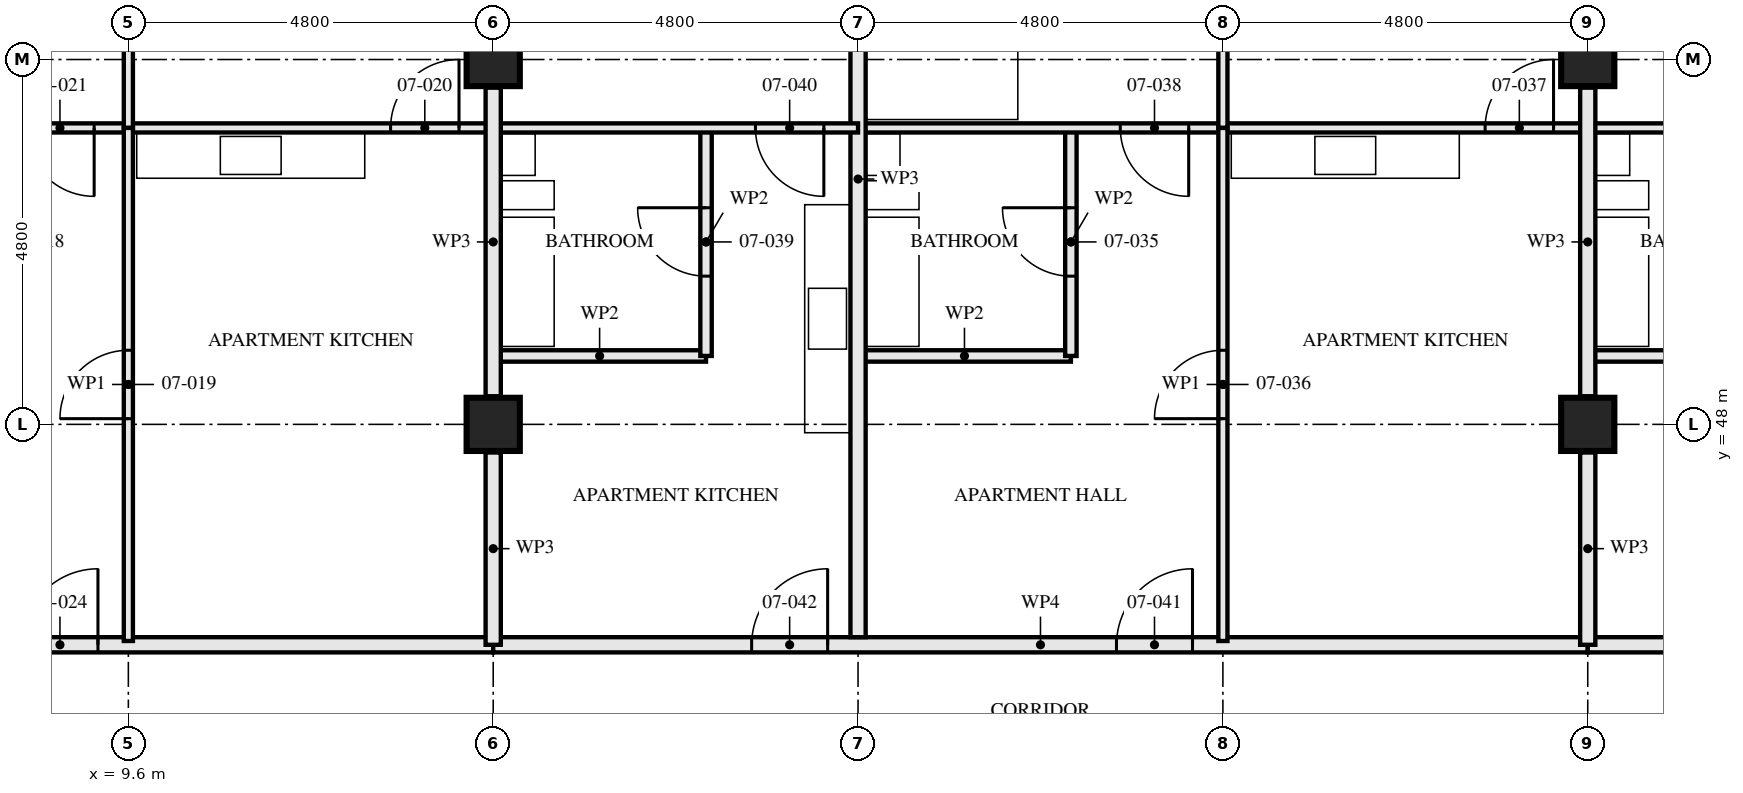
"""IFC4 building model, lengths in metres.
Left out: names, types, materials, properties, quantities, classifications, styles, units other than length and angle.
Written with IfcOpenShell. Run it as: python <this file> out.ifc"""

import sys

from ifc_helpers import new_model, si_unit, direction, frame, frame_2d, origin, origin_2d, place, context, subcontext, project, spatial, rectangle, hollow_rectangle, extrude, element, fill, save


model = new_model("IFC4")
c1 = context("Model", 3, precision=1e-05, world=origin(), true_north=direction((0.0, 1.0)))
c2 = subcontext(c1, "Body", "Model", "MODEL_VIEW")
j1 = project(units=[si_unit("LENGTHUNIT", "METRE"), si_unit("PLANEANGLEUNIT", "RADIAN")], contexts=[c1])
p1 = place(None, origin())
s1 = spatial("IfcSite", under=j1, at=p1, CompositionType="ELEMENT")
p2 = place(p1, origin())
s2 = spatial("IfcBuilding", under=s1, at=p2, CompositionType="ELEMENT")
p3 = place(p2, frame((0.0, 0.0, 30.5)))
s3 = spatial("IfcBuildingStorey", under=s2, at=p3, CompositionType="ELEMENT", Elevation=30.5)
for number, where, z_axis, x_axis in (
    (1, (14.4, 48.0, 0.0), (0.0, 0.0, 1.0), (1.0, 0.0, 0.0)),
    (2, (14.4, 52.8, 0.0), (0.0, 0.0, 1.0), (1.0, 0.0, 0.0)),
    (3, (28.8, 48.0, 0.0), (0.0, 0.0, 1.0), (1.0, 0.0, 0.0)),
    (4, (28.8, 52.8, 0.0), (0.0, 0.0, 1.0), (1.0, 0.0, 0.0)),
):
    element("IfcColumn", number, at=place(p3, frame(where, z_axis=z_axis, x_axis=x_axis)), inside=s3, PredefinedType="COLUMN", context=c2, shape_type="SweptSolid", body=[
        extrude(hollow_rectangle(XDim=0.7, YDim=0.7, WallThickness=0.06, at=origin_2d()), origin(), (0.0, 0.0, 1.0), 3.5),
    ])
p4 = place(p3, frame((9.6, 51.9, 0.0), z_axis=(0.0, 0.0, 1.0), x_axis=(0.0, -1.0, 0.0)))
e5 = element("IfcWall", 5, at=p4, inside=s3, PredefinedType="PARTITIONING", context=c2, shape_type="SweptSolid", body=[
    extrude(rectangle(XDim=6.75, YDim=0.12, at=frame_2d((3.375, 0.0))), origin(), (0.0, 0.0, 1.0), 2.55),
])
p5 = place(p4, frame((2.925, 0.0, 0.0)))
e6 = element("IfcOpeningElement", 6, at=p5, cuts=e5, PredefinedType="OPENING", context=c2, shape_type="SweptSolid", body=[
    extrude(rectangle(XDim=0.9, YDim=2.1, at=frame_2d((0.45, 1.05))), frame((0.0, 0.071, 0.0), z_axis=(0.0, -1.0, 0.0), x_axis=(1.0, 0.0, 0.0)), (0.0, 0.0, 1.0), 0.141),
])
p6 = place(p3, frame((14.4, 51.9, 0.0), z_axis=(0.0, 0.0, 1.0), x_axis=(-1.0, 0.0, 0.0)))
e7 = element("IfcWall", 7, at=p6, inside=s3, PredefinedType="PARTITIONING", context=c2, shape_type="SweptSolid", body=[
    extrude(rectangle(XDim=4.8, YDim=0.12, at=frame_2d((2.4, 0.0))), origin(), (0.0, 0.0, 1.0), 3.33),
])
p7 = place(p6, frame((0.45, 0.0, 0.0)))
e8 = element("IfcOpeningElement", 8, at=p7, cuts=e7, PredefinedType="OPENING", context=c2, shape_type="SweptSolid", body=[
    extrude(rectangle(XDim=0.9, YDim=2.1, at=frame_2d((0.45, 1.05))), frame((0.0, 0.071, 0.0), z_axis=(0.0, -1.0, 0.0), x_axis=(1.0, 0.0, 0.0)), (0.0, 0.0, 1.0), 0.141),
])
p8 = place(p3, frame((9.6, 51.9, 0.0), z_axis=(0.0, 0.0, 1.0), x_axis=(-1.0, 0.0, 0.0)))
e9 = element("IfcWall", 9, at=p8, inside=s3, PredefinedType="PARTITIONING", context=c2, shape_type="SweptSolid", body=[
    extrude(rectangle(XDim=4.8, YDim=0.12, at=frame_2d((2.4, 0.0))), origin(), (0.0, 0.0, 1.0), 3.33),
])
p9 = place(p8, frame((0.45, 0.0, 0.0)))
e10 = element("IfcOpeningElement", 10, at=p9, cuts=e9, PredefinedType="OPENING", context=c2, shape_type="SweptSolid", body=[
    extrude(rectangle(XDim=0.9, YDim=2.1, at=frame_2d((0.45, 1.05))), frame((0.0, 0.071, 0.0), z_axis=(0.0, -1.0, 0.0), x_axis=(1.0, 0.0, 0.0)), (0.0, 0.0, 1.0), 0.141),
])
p10 = place(p3, frame((9.6, 57.28, 0.0), z_axis=(0.0, 0.0, 1.0), x_axis=(0.0, -1.0, 0.0)))
e11 = element("IfcWall", 11, at=p10, inside=s3, PredefinedType="PARTITIONING", context=c2, shape_type="SweptSolid", body=[
    extrude(rectangle(XDim=5.38, YDim=0.12, at=frame_2d((2.69, 0.0))), origin(), (0.0, 0.0, 1.0), 2.55),
])
p11 = place(p3, frame((14.4, 45.1, 0.0), z_axis=(0.0, 0.0, 1.0), x_axis=(-1.0, 0.0, 0.0)))
e12 = element("IfcWall", 12, at=p11, inside=s3, PredefinedType="PARTITIONING", context=c2, shape_type="SweptSolid", body=[
    extrude(rectangle(XDim=9.6, YDim=0.2, at=frame_2d((4.8, 0.0))), origin(), (0.0, 0.0, 1.0), 3.33),
])
p12 = place(p11, frame((5.2, 0.0, 0.0)))
e13 = element("IfcOpeningElement", 13, at=p12, cuts=e12, PredefinedType="OPENING", context=c2, shape_type="SweptSolid", body=[
    extrude(rectangle(XDim=1.0, YDim=2.1, at=frame_2d((0.5, 1.05))), frame((0.0, 0.111, 0.0), z_axis=(0.0, -1.0, 0.0), x_axis=(1.0, 0.0, 0.0)), (0.0, 0.0, 1.0), 0.221),
])
p13 = place(p3, frame((22.0, 51.9, 0.0), z_axis=(0.0, 0.0, 1.0), x_axis=(0.0, -1.0, 0.0)))
e14 = element("IfcWall", 14, at=p13, inside=s3, PredefinedType="PARTITIONING", context=c2, shape_type="SweptSolid", body=[
    extrude(rectangle(XDim=3.0, YDim=0.15, at=frame_2d((1.5, 0.0))), origin(), (0.0, 0.0, 1.0), 3.33),
])
p14 = place(p13, frame((1.05, 0.0, 0.0)))
e15 = element("IfcOpeningElement", 15, at=p14, cuts=e14, PredefinedType="OPENING", context=c2, shape_type="SweptSolid", body=[
    extrude(rectangle(XDim=0.9, YDim=2.1, at=frame_2d((0.45, 1.05))), frame((0.0, 0.085, 0.0), z_axis=(0.0, -1.0, 0.0), x_axis=(1.0, 0.0, 0.0)), (0.0, 0.0, 1.0), 0.171),
])
p15 = place(p3, frame((22.0, 48.9, 0.0), z_axis=(0.0, 0.0, 1.0), x_axis=(-1.0, 0.0, 0.0)))
e16 = element("IfcWall", 16, at=p15, inside=s3, PredefinedType="PARTITIONING", context=c2, shape_type="SweptSolid", body=[
    extrude(rectangle(XDim=2.8, YDim=0.15, at=frame_2d((1.4, 0.0))), origin(), (0.0, 0.0, 1.0), 3.33),
])
p16 = place(p3, frame((24.0, 51.9, 0.0), z_axis=(0.0, 0.0, 1.0), x_axis=(0.0, -1.0, 0.0)))
e17 = element("IfcWall", 17, at=p16, inside=s3, PredefinedType="PARTITIONING", context=c2, shape_type="SweptSolid", body=[
    extrude(rectangle(XDim=6.75, YDim=0.12, at=frame_2d((3.375, 0.0))), origin(), (0.0, 0.0, 1.0), 2.55),
])
p17 = place(p16, frame((2.925, 0.0, 0.0)))
e18 = element("IfcOpeningElement", 18, at=p17, cuts=e17, PredefinedType="OPENING", context=c2, shape_type="SweptSolid", body=[
    extrude(rectangle(XDim=0.9, YDim=2.1, at=frame_2d((0.45, 1.05))), frame((0.0, 0.071, 0.0), z_axis=(0.0, -1.0, 0.0), x_axis=(1.0, 0.0, 0.0)), (0.0, 0.0, 1.0), 0.141),
])
p18 = place(p3, frame((28.8, 51.9, 0.0), z_axis=(0.0, 0.0, 1.0), x_axis=(-1.0, 0.0, 0.0)))
e19 = element("IfcWall", 19, at=p18, inside=s3, PredefinedType="PARTITIONING", context=c2, shape_type="SweptSolid", body=[
    extrude(rectangle(XDim=4.8, YDim=0.12, at=frame_2d((2.4, 0.0))), origin(), (0.0, 0.0, 1.0), 3.33),
])
p19 = place(p18, frame((0.45, 0.0, 0.0)))
e20 = element("IfcOpeningElement", 20, at=p19, cuts=e19, PredefinedType="OPENING", context=c2, shape_type="SweptSolid", body=[
    extrude(rectangle(XDim=0.9, YDim=2.1, at=frame_2d((0.45, 1.05))), frame((0.0, 0.071, 0.0), z_axis=(0.0, -1.0, 0.0), x_axis=(1.0, 0.0, 0.0)), (0.0, 0.0, 1.0), 0.141),
])
p20 = place(p3, frame((24.0, 51.9, 0.0), z_axis=(0.0, 0.0, 1.0), x_axis=(-1.0, 0.0, 0.0)))
e21 = element("IfcWall", 21, at=p20, inside=s3, PredefinedType="PARTITIONING", context=c2, shape_type="SweptSolid", body=[
    extrude(rectangle(XDim=4.8, YDim=0.12, at=frame_2d((2.4, 0.0))), origin(), (0.0, 0.0, 1.0), 3.33),
])
p21 = place(p20, frame((0.45, 0.0, 0.0)))
e22 = element("IfcOpeningElement", 22, at=p21, cuts=e21, PredefinedType="OPENING", context=c2, shape_type="SweptSolid", body=[
    extrude(rectangle(XDim=0.9, YDim=2.1, at=frame_2d((0.45, 1.05))), frame((0.0, 0.071, 0.0), z_axis=(0.0, -1.0, 0.0), x_axis=(1.0, 0.0, 0.0)), (0.0, 0.0, 1.0), 0.141),
])
p22 = place(p3, frame((24.0, 57.255, 0.0), z_axis=(0.0, 0.0, 1.0), x_axis=(0.0, -1.0, 0.0)))
e23 = element("IfcWall", 23, at=p22, inside=s3, PredefinedType="PARTITIONING", context=c2, shape_type="SweptSolid", body=[
    extrude(rectangle(XDim=5.355, YDim=0.12, at=frame_2d((2.677, 0.0))), origin(), (0.0, 0.0, 1.0), 2.55),
])
p23 = place(p3, frame((19.2, 57.255, 0.0), z_axis=(0.0, 0.0, 1.0), x_axis=(0.0, -1.0, 0.0)))
e24 = element("IfcWall", 24, at=p23, inside=s3, PredefinedType="PARTITIONING", context=c2, shape_type="SweptSolid", body=[
    extrude(rectangle(XDim=12.055, YDim=0.2, at=frame_2d((6.027, 0.0))), origin(), (0.0, 0.0, 1.0), 2.55),
])
p24 = place(p3, frame((17.2, 51.9, 0.0), z_axis=(0.0, 0.0, 1.0), x_axis=(0.0, -1.0, 0.0)))
e25 = element("IfcWall", 25, at=p24, inside=s3, PredefinedType="PARTITIONING", context=c2, shape_type="SweptSolid", body=[
    extrude(rectangle(XDim=3.0, YDim=0.15, at=frame_2d((1.5, 0.0))), origin(), (0.0, 0.0, 1.0), 3.33),
])
p25 = place(p24, frame((1.05, 0.0, 0.0)))
e26 = element("IfcOpeningElement", 26, at=p25, cuts=e25, PredefinedType="OPENING", context=c2, shape_type="SweptSolid", body=[
    extrude(rectangle(XDim=0.9, YDim=2.1, at=frame_2d((0.45, 1.05))), frame((0.0, 0.085, 0.0), z_axis=(0.0, -1.0, 0.0), x_axis=(1.0, 0.0, 0.0)), (0.0, 0.0, 1.0), 0.171),
])
p26 = place(p3, frame((17.2, 48.9, 0.0), z_axis=(0.0, 0.0, 1.0), x_axis=(-1.0, 0.0, 0.0)))
e27 = element("IfcWall", 27, at=p26, inside=s3, PredefinedType="PARTITIONING", context=c2, shape_type="SweptSolid", body=[
    extrude(rectangle(XDim=2.8, YDim=0.15, at=frame_2d((1.4, 0.0))), origin(), (0.0, 0.0, 1.0), 3.33),
])
p27 = place(p3, frame((19.2, 51.9, 0.0), z_axis=(0.0, 0.0, 1.0), x_axis=(-1.0, 0.0, 0.0)))
e28 = element("IfcWall", 28, at=p27, inside=s3, PredefinedType="PARTITIONING", context=c2, shape_type="SweptSolid", body=[
    extrude(rectangle(XDim=4.8, YDim=0.12, at=frame_2d((2.4, 0.0))), origin(), (0.0, 0.0, 1.0), 3.33),
])
p28 = place(p27, frame((0.45, 0.0, 0.0)))
e29 = element("IfcOpeningElement", 29, at=p28, cuts=e28, PredefinedType="OPENING", context=c2, shape_type="SweptSolid", body=[
    extrude(rectangle(XDim=0.9, YDim=2.1, at=frame_2d((0.45, 1.05))), frame((0.0, 0.071, 0.0), z_axis=(0.0, -1.0, 0.0), x_axis=(1.0, 0.0, 0.0)), (0.0, 0.0, 1.0), 0.141),
])
p29 = place(p3, frame((28.8, 45.1, 0.0), z_axis=(0.0, 0.0, 1.0), x_axis=(-1.0, 0.0, 0.0)))
e30 = element("IfcWall", 30, at=p29, inside=s3, PredefinedType="PARTITIONING", context=c2, shape_type="SweptSolid", body=[
    extrude(rectangle(XDim=14.4, YDim=0.2, at=frame_2d((7.2, 0.0))), origin(), (0.0, 0.0, 1.0), 3.33),
])
p30 = place(p29, frame((5.2, 0.0, 0.0)))
e31 = element("IfcOpeningElement", 31, at=p30, cuts=e30, PredefinedType="OPENING", context=c2, shape_type="SweptSolid", body=[
    extrude(rectangle(XDim=1.0, YDim=2.1, at=frame_2d((0.5, 1.05))), frame((0.0, 0.111, 0.0), z_axis=(0.0, -1.0, 0.0), x_axis=(1.0, 0.0, 0.0)), (0.0, 0.0, 1.0), 0.221),
])
p31 = place(p29, frame((10.0, 0.0, 0.0)))
e32 = element("IfcOpeningElement", 32, at=p31, cuts=e30, PredefinedType="OPENING", context=c2, shape_type="SweptSolid", body=[
    extrude(rectangle(XDim=1.0, YDim=2.1, at=frame_2d((0.5, 1.05))), frame((0.0, 0.111, 0.0), z_axis=(0.0, -1.0, 0.0), x_axis=(1.0, 0.0, 0.0)), (0.0, 0.0, 1.0), 0.221),
])
p32 = place(p3, frame((31.6, 48.9, 0.0), z_axis=(0.0, 0.0, 1.0), x_axis=(-1.0, 0.0, 0.0)))
e33 = element("IfcWall", 33, at=p32, inside=s3, PredefinedType="PARTITIONING", context=c2, shape_type="SweptSolid", body=[
    extrude(rectangle(XDim=2.8, YDim=0.15, at=frame_2d((1.4, 0.0))), origin(), (0.0, 0.0, 1.0), 3.33),
])
p33 = place(p3, frame((33.6, 51.9, 0.0), z_axis=(0.0, 0.0, 1.0), x_axis=(-1.0, 0.0, 0.0)))
e34 = element("IfcWall", 34, at=p33, inside=s3, PredefinedType="PARTITIONING", context=c2, shape_type="SweptSolid", body=[
    extrude(rectangle(XDim=4.8, YDim=0.12, at=frame_2d((2.4, 0.0))), origin(), (0.0, 0.0, 1.0), 3.33),
])
p34 = place(p33, frame((0.45, 0.0, 0.0)))
e35 = element("IfcOpeningElement", 35, at=p34, cuts=e34, PredefinedType="OPENING", context=c2, shape_type="SweptSolid", body=[
    extrude(rectangle(XDim=0.9, YDim=2.1, at=frame_2d((0.45, 1.05))), frame((0.0, 0.071, 0.0), z_axis=(0.0, -1.0, 0.0), x_axis=(1.0, 0.0, 0.0)), (0.0, 0.0, 1.0), 0.141),
])
p35 = place(p3, frame((38.4, 45.1, 0.0), z_axis=(0.0, 0.0, 1.0), x_axis=(-1.0, 0.0, 0.0)))
e36 = element("IfcWall", 36, at=p35, inside=s3, PredefinedType="PARTITIONING", context=c2, shape_type="SweptSolid", body=[
    extrude(rectangle(XDim=9.6, YDim=0.2, at=frame_2d((4.8, 0.0))), origin(), (0.0, 0.0, 1.0), 3.33),
])
p36 = place(p35, frame((0.4, 0.0, 0.0)))
e37 = element("IfcOpeningElement", 37, at=p36, cuts=e36, PredefinedType="OPENING", context=c2, shape_type="SweptSolid", body=[
    extrude(rectangle(XDim=1.0, YDim=2.1, at=frame_2d((0.5, 1.05))), frame((0.0, 0.111, 0.0), z_axis=(0.0, -1.0, 0.0), x_axis=(1.0, 0.0, 0.0)), (0.0, 0.0, 1.0), 0.221),
])
p37 = place(p35, frame((5.2, 0.0, 0.0)))
e38 = element("IfcOpeningElement", 38, at=p37, cuts=e36, PredefinedType="OPENING", context=c2, shape_type="SweptSolid", body=[
    extrude(rectangle(XDim=1.0, YDim=2.1, at=frame_2d((0.5, 1.05))), frame((0.0, 0.111, 0.0), z_axis=(0.0, -1.0, 0.0), x_axis=(1.0, 0.0, 0.0)), (0.0, 0.0, 1.0), 0.221),
])
p38 = place(p3, frame((14.4, 45.1, 0.0), z_axis=(0.0, 0.0, 1.0), x_axis=(0.0, 1.0, 0.0)))
e39 = element("IfcWall", 39, at=p38, inside=s3, PredefinedType="PARTITIONING", context=c2, shape_type="SweptSolid", body=[
    extrude(rectangle(XDim=2.53, YDim=0.2, at=frame_2d((1.265, 0.0))), origin(), (0.0, 0.0, 1.0), 2.32),
])
p39 = place(p3, frame((14.4, 48.37, 0.0), z_axis=(0.0, 0.0, 1.0), x_axis=(0.0, 1.0, 0.0)))
e40 = element("IfcWall", 40, at=p39, inside=s3, PredefinedType="PARTITIONING", context=c2, shape_type="SweptSolid", body=[
    extrude(rectangle(XDim=4.06, YDim=0.2, at=frame_2d((2.03, 0.0))), origin(), (0.0, 0.0, 1.0), 2.32),
])
p40 = place(p3, frame((28.8, 45.1, 0.0), z_axis=(0.0, 0.0, 1.0), x_axis=(0.0, 1.0, 0.0)))
e41 = element("IfcWall", 41, at=p40, inside=s3, PredefinedType="PARTITIONING", context=c2, shape_type="SweptSolid", body=[
    extrude(rectangle(XDim=2.53, YDim=0.2, at=frame_2d((1.265, 0.0))), origin(), (0.0, 0.0, 1.0), 2.32),
])
p41 = place(p3, frame((28.8, 48.37, 0.0), z_axis=(0.0, 0.0, 1.0), x_axis=(0.0, 1.0, 0.0)))
e42 = element("IfcWall", 42, at=p41, inside=s3, PredefinedType="PARTITIONING", context=c2, shape_type="SweptSolid", body=[
    extrude(rectangle(XDim=4.06, YDim=0.2, at=frame_2d((2.03, 0.0))), origin(), (0.0, 0.0, 1.0), 2.32),
])
p42 = place(p5, frame((0.9, 0.0, 0.0), z_axis=(0.0, 0.0, 1.0), x_axis=(-1.0, 0.0, 0.0)))
e43 = element("IfcDoor", 43, at=p42, inside=s3, OperationType="SINGLE_SWING_RIGHT", PredefinedType="DOOR", context=c2, shape_type="SweptSolid", body=[
    extrude(rectangle(XDim=0.9, YDim=2.1, at=frame_2d((0.45, 1.05))), frame((0.0, 0.022, 0.0), z_axis=(0.0, -1.0, 0.0), x_axis=(1.0, 0.0, 0.0)), (0.0, 0.0, 1.0), 0.044),
])
fill(e6, e43)
p43 = place(p7, frame((0.9, 0.0, 0.0), z_axis=(0.0, 0.0, 1.0), x_axis=(-1.0, 0.0, 0.0)))
e44 = element("IfcDoor", 44, at=p43, inside=s3, OperationType="SINGLE_SWING_LEFT", PredefinedType="DOOR", context=c2, shape_type="SweptSolid", body=[
    extrude(rectangle(XDim=0.9, YDim=2.1, at=frame_2d((0.45, 1.05))), frame((0.0, 0.022, 0.0), z_axis=(0.0, -1.0, 0.0), x_axis=(1.0, 0.0, 0.0)), (0.0, 0.0, 1.0), 0.044),
])
fill(e8, e44)
p44 = place(p9, origin())
e45 = element("IfcDoor", 45, at=p44, inside=s3, OperationType="SINGLE_SWING_RIGHT", PredefinedType="DOOR", context=c2, shape_type="SweptSolid", body=[
    extrude(rectangle(XDim=0.9, YDim=2.1, at=frame_2d((0.45, 1.05))), frame((0.0, 0.022, 0.0), z_axis=(0.0, -1.0, 0.0), x_axis=(1.0, 0.0, 0.0)), (0.0, 0.0, 1.0), 0.044),
])
fill(e10, e45)
p45 = place(p12, frame((1.0, 0.0, 0.0), z_axis=(0.0, 0.0, 1.0), x_axis=(-1.0, 0.0, 0.0)))
e46 = element("IfcDoor", 46, at=p45, inside=s3, OperationType="SINGLE_SWING_LEFT", PredefinedType="DOOR", context=c2, shape_type="SweptSolid", body=[
    extrude(rectangle(XDim=1.0, YDim=2.1, at=frame_2d((0.5, 1.05))), frame((0.0, 0.027, 0.0), z_axis=(0.0, -1.0, 0.0), x_axis=(1.0, 0.0, 0.0)), (0.0, 0.0, 1.0), 0.054),
])
fill(e13, e46)
p46 = place(p14, frame((0.9, 0.0, 0.0), z_axis=(0.0, 0.0, 1.0), x_axis=(-1.0, 0.0, 0.0)))
e47 = element("IfcDoor", 47, at=p46, inside=s3, OperationType="SINGLE_SWING_LEFT", PredefinedType="DOOR", context=c2, shape_type="SweptSolid", body=[
    extrude(rectangle(XDim=0.9, YDim=2.1, at=frame_2d((0.45, 1.05))), frame((0.0, 0.022, 0.0), z_axis=(0.0, -1.0, 0.0), x_axis=(1.0, 0.0, 0.0)), (0.0, 0.0, 1.0), 0.044),
])
fill(e15, e47)
p47 = place(p17, frame((0.9, 0.0, 0.0), z_axis=(0.0, 0.0, 1.0), x_axis=(-1.0, 0.0, 0.0)))
e48 = element("IfcDoor", 48, at=p47, inside=s3, OperationType="SINGLE_SWING_RIGHT", PredefinedType="DOOR", context=c2, shape_type="SweptSolid", body=[
    extrude(rectangle(XDim=0.9, YDim=2.1, at=frame_2d((0.45, 1.05))), frame((0.0, 0.022, 0.0), z_axis=(0.0, -1.0, 0.0), x_axis=(1.0, 0.0, 0.0)), (0.0, 0.0, 1.0), 0.044),
])
fill(e18, e48)
p48 = place(p19, frame((0.9, 0.0, 0.0), z_axis=(0.0, 0.0, 1.0), x_axis=(-1.0, 0.0, 0.0)))
e49 = element("IfcDoor", 49, at=p48, inside=s3, OperationType="SINGLE_SWING_LEFT", PredefinedType="DOOR", context=c2, shape_type="SweptSolid", body=[
    extrude(rectangle(XDim=0.9, YDim=2.1, at=frame_2d((0.45, 1.05))), frame((0.0, 0.022, 0.0), z_axis=(0.0, -1.0, 0.0), x_axis=(1.0, 0.0, 0.0)), (0.0, 0.0, 1.0), 0.044),
])
fill(e20, e49)
p49 = place(p21, origin())
e50 = element("IfcDoor", 50, at=p49, inside=s3, OperationType="SINGLE_SWING_RIGHT", PredefinedType="DOOR", context=c2, shape_type="SweptSolid", body=[
    extrude(rectangle(XDim=0.9, YDim=2.1, at=frame_2d((0.45, 1.05))), frame((0.0, 0.022, 0.0), z_axis=(0.0, -1.0, 0.0), x_axis=(1.0, 0.0, 0.0)), (0.0, 0.0, 1.0), 0.044),
])
fill(e22, e50)
p50 = place(p25, frame((0.9, 0.0, 0.0), z_axis=(0.0, 0.0, 1.0), x_axis=(-1.0, 0.0, 0.0)))
e51 = element("IfcDoor", 51, at=p50, inside=s3, OperationType="SINGLE_SWING_LEFT", PredefinedType="DOOR", context=c2, shape_type="SweptSolid", body=[
    extrude(rectangle(XDim=0.9, YDim=2.1, at=frame_2d((0.45, 1.05))), frame((0.0, 0.022, 0.0), z_axis=(0.0, -1.0, 0.0), x_axis=(1.0, 0.0, 0.0)), (0.0, 0.0, 1.0), 0.044),
])
fill(e26, e51)
p51 = place(p28, origin())
e52 = element("IfcDoor", 52, at=p51, inside=s3, OperationType="SINGLE_SWING_RIGHT", PredefinedType="DOOR", context=c2, shape_type="SweptSolid", body=[
    extrude(rectangle(XDim=0.9, YDim=2.1, at=frame_2d((0.45, 1.05))), frame((0.0, 0.022, 0.0), z_axis=(0.0, -1.0, 0.0), x_axis=(1.0, 0.0, 0.0)), (0.0, 0.0, 1.0), 0.044),
])
fill(e29, e52)
p52 = place(p30, frame((1.0, 0.0, 0.0), z_axis=(0.0, 0.0, 1.0), x_axis=(-1.0, 0.0, 0.0)))
e53 = element("IfcDoor", 53, at=p52, inside=s3, OperationType="SINGLE_SWING_LEFT", PredefinedType="DOOR", context=c2, shape_type="SweptSolid", body=[
    extrude(rectangle(XDim=1.0, YDim=2.1, at=frame_2d((0.5, 1.05))), frame((0.0, 0.027, 0.0), z_axis=(0.0, -1.0, 0.0), x_axis=(1.0, 0.0, 0.0)), (0.0, 0.0, 1.0), 0.054),
])
fill(e31, e53)
p53 = place(p31, frame((1.0, 0.0, 0.0), z_axis=(0.0, 0.0, 1.0), x_axis=(-1.0, 0.0, 0.0)))
e54 = element("IfcDoor", 54, at=p53, inside=s3, OperationType="SINGLE_SWING_LEFT", PredefinedType="DOOR", context=c2, shape_type="SweptSolid", body=[
    extrude(rectangle(XDim=1.0, YDim=2.1, at=frame_2d((0.5, 1.05))), frame((0.0, 0.027, 0.0), z_axis=(0.0, -1.0, 0.0), x_axis=(1.0, 0.0, 0.0)), (0.0, 0.0, 1.0), 0.054),
])
fill(e32, e54)
save(model, sys.argv[1])
